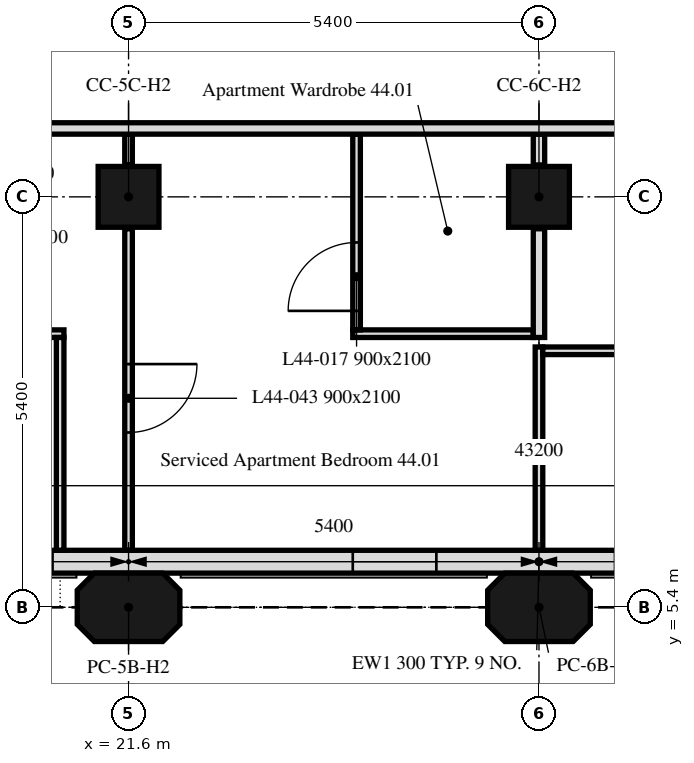
"""IFC4 building model, lengths in metres.
Left out: names, types, materials, properties, quantities, classifications, styles, units other than length and angle.
Written with IfcOpenShell. Run it as: python <this file> out.ifc"""

import sys

from ifc_helpers import new_model, si_unit, direction, frame, frame_2d, origin, origin_2d, place, context, subcontext, project, spatial, polyline, rectangle, outline, extrude, element, fill, save


model = new_model("IFC4")
c1 = context("Model", 3, precision=1e-05, world=origin(), true_north=direction((0.0, 1.0)))
c2 = subcontext(c1, "Body", "Model", "MODEL_VIEW")
j1 = project(units=[si_unit("LENGTHUNIT", "METRE"), si_unit("PLANEANGLEUNIT", "RADIAN")], contexts=[c1])
p1 = place(None, origin())
s1 = spatial("IfcSite", under=j1, at=p1, CompositionType="ELEMENT")
p2 = place(p1, origin())
s2 = spatial("IfcBuilding", under=s1, at=p2, CompositionType="ELEMENT")
p3 = place(p2, frame((0.0, 0.0, 184.0)))
s3 = spatial("IfcBuildingStorey", under=s2, at=p3, CompositionType="ELEMENT", Elevation=184.0)
for number, where, z_axis, x_axis in (
    (1, (21.6, 5.4, 0.0), (0.0, 0.0, 1.0), (1.0, 0.0, 0.0)),
    (2, (27.0, 5.4, 0.0), (0.0, 0.0, 1.0), (1.0, 0.0, 0.0)),
):
    element("IfcColumn", number, at=place(p3, frame(where, z_axis=z_axis, x_axis=x_axis)), inside=s3, PredefinedType="COLUMN", context=c2, shape_type="SweptSolid", body=[
        extrude(outline(polyline([(-0.45, -0.45), (0.45, -0.45), (0.675, -0.225), (0.675, 0.225), (0.45, 0.45), (-0.45, 0.45), (-0.675, 0.225), (-0.675, -0.225), (-0.45, -0.45)])), origin(), (0.0, 0.0, 1.0), 3.0),
    ])
for number, where, z_axis, x_axis in (
    (3, (21.6, 10.8, 0.0), (0.0, 0.0, 1.0), (1.0, 0.0, 0.0)),
    (4, (27.0, 10.8, 0.0), (0.0, 0.0, 1.0), (1.0, 0.0, 0.0)),
):
    element("IfcColumn", number, at=place(p3, frame(where, z_axis=z_axis, x_axis=x_axis)), inside=s3, PredefinedType="COLUMN", context=c2, shape_type="SweptSolid", body=[
        extrude(rectangle(XDim=0.8, YDim=0.8, at=origin_2d()), origin(), (0.0, 0.0, 1.0), 3.0),
    ])
p4 = place(p3, frame((10.986, 6.0, 0.0), z_axis=(0.0, 0.0, 1.0), x_axis=(1.0, 0.0, 0.0)))
e5 = element("IfcWall", 5, at=p4, inside=s3, PredefinedType="SOLIDWALL", context=c2, shape_type="SweptSolid", body=[
    extrude(rectangle(XDim=32.027, YDim=0.3, at=frame_2d((16.014, 0.0))), origin(), (0.0, 0.0, 1.0), 3.0),
])
p5 = place(p4, frame((2.764, 0.0, 0.9)))
e6 = element("IfcOpeningElement", 6, at=p5, cuts=e5, PredefinedType="OPENING", context=c2, shape_type="SweptSolid", body=[
    extrude(rectangle(XDim=1.1, YDim=1.7, at=frame_2d((0.55, 0.85))), frame((0.0, 0.16, 0.0), z_axis=(0.0, -1.0, 0.0), x_axis=(1.0, 0.0, 0.0)), (0.0, 0.0, 1.0), 0.32),
])
p6 = place(p4, frame((6.214, 0.0, 0.9)))
e7 = element("IfcOpeningElement", 7, at=p6, cuts=e5, PredefinedType="OPENING", context=c2, shape_type="SweptSolid", body=[
    extrude(rectangle(XDim=3.4, YDim=1.7, at=frame_2d((1.7, 0.85))), frame((0.0, 0.16, 0.0), z_axis=(0.0, -1.0, 0.0), x_axis=(1.0, 0.0, 0.0)), (0.0, 0.0, 1.0), 0.32),
])
p7 = place(p4, frame((13.564, 0.0, 0.9)))
e8 = element("IfcOpeningElement", 8, at=p7, cuts=e5, PredefinedType="OPENING", context=c2, shape_type="SweptSolid", body=[
    extrude(rectangle(XDim=1.1, YDim=1.7, at=frame_2d((0.55, 0.85))), frame((0.0, 0.16, 0.0), z_axis=(0.0, -1.0, 0.0), x_axis=(1.0, 0.0, 0.0)), (0.0, 0.0, 1.0), 0.32),
])
p8 = place(p4, frame((17.014, 0.0, 0.9)))
e9 = element("IfcOpeningElement", 9, at=p8, cuts=e5, PredefinedType="OPENING", context=c2, shape_type="SweptSolid", body=[
    extrude(rectangle(XDim=3.4, YDim=1.7, at=frame_2d((1.7, 0.85))), frame((0.0, 0.16, 0.0), z_axis=(0.0, -1.0, 0.0), x_axis=(1.0, 0.0, 0.0)), (0.0, 0.0, 1.0), 0.32),
])
p9 = place(p4, frame((24.364, 0.0, 0.9)))
e10 = element("IfcOpeningElement", 10, at=p9, cuts=e5, PredefinedType="OPENING", context=c2, shape_type="SweptSolid", body=[
    extrude(rectangle(XDim=1.1, YDim=1.7, at=frame_2d((0.55, 0.85))), frame((0.0, 0.16, 0.0), z_axis=(0.0, -1.0, 0.0), x_axis=(1.0, 0.0, 0.0)), (0.0, 0.0, 1.0), 0.32),
])
p10 = place(p4, frame((27.814, 0.0, 0.9)))
e11 = element("IfcOpeningElement", 11, at=p10, cuts=e5, PredefinedType="OPENING", context=c2, shape_type="SweptSolid", body=[
    extrude(rectangle(XDim=3.4, YDim=1.7, at=frame_2d((1.7, 0.85))), frame((0.0, 0.16, 0.0), z_axis=(0.0, -1.0, 0.0), x_axis=(1.0, 0.0, 0.0)), (0.0, 0.0, 1.0), 0.32),
])
p11 = place(p3, frame((27.0, 6.151, 0.0), z_axis=(0.0, 0.0, 1.0), x_axis=(0.0, 1.0, 0.0)))
e12 = element("IfcWall", 12, at=p11, inside=s3, PredefinedType="PARTITIONING", context=c2, shape_type="SweptSolid", body=[
    extrude(rectangle(XDim=2.674, YDim=0.1, at=frame_2d((1.337, 0.0))), origin(), (0.0, 0.0, 1.0), 3.0),
])
p12 = place(p3, frame((26.925, 9.0, 0.0), z_axis=(0.0, 0.0, 1.0), x_axis=(-1.0, 0.0, 0.0)))
e13 = element("IfcWall", 13, at=p12, inside=s3, PredefinedType="PARTITIONING", context=c2, shape_type="SweptSolid", body=[
    extrude(rectangle(XDim=2.375, YDim=0.1, at=frame_2d((1.188, 0.0))), origin(), (0.0, 0.0, 1.0), 3.0),
])
p13 = place(p3, frame((24.6, 9.05, 0.0), z_axis=(0.0, 0.0, 1.0), x_axis=(0.0, 1.0, 0.0)))
e14 = element("IfcWall", 14, at=p13, inside=s3, PredefinedType="PARTITIONING", context=c2, shape_type="SweptSolid", body=[
    extrude(rectangle(XDim=2.575, YDim=0.1, at=frame_2d((1.288, 0.0))), origin(), (0.0, 0.0, 1.0), 3.0),
])
p14 = place(p13, frame((0.25, 0.0, 0.0)))
e15 = element("IfcOpeningElement", 15, at=p14, cuts=e14, PredefinedType="OPENING", context=c2, shape_type="SweptSolid", body=[
    extrude(rectangle(XDim=0.9, YDim=2.1, at=frame_2d((0.45, 1.05))), frame((0.0, 0.05, 0.0), z_axis=(0.0, -1.0, 0.0), x_axis=(1.0, 0.0, 0.0)), (0.0, 0.0, 1.0), 0.1),
])
p15 = place(p3, frame((21.6, 11.625, 0.0), z_axis=(0.0, 0.0, 1.0), x_axis=(0.0, -1.0, 0.0)))
e16 = element("IfcWall", 16, at=p15, inside=s3, PredefinedType="PARTITIONING", context=c2, shape_type="SweptSolid", body=[
    extrude(rectangle(XDim=0.405, YDim=0.1, at=frame_2d((0.203, 0.0))), origin(), (0.0, 0.0, 1.0), 3.0),
])
p16 = place(p3, frame((21.6, 10.38, 0.0), z_axis=(0.0, 0.0, 1.0), x_axis=(0.0, -1.0, 0.0)))
e17 = element("IfcWall", 17, at=p16, inside=s3, PredefinedType="PARTITIONING", context=c2, shape_type="SweptSolid", body=[
    extrude(rectangle(XDim=4.229, YDim=0.1, at=frame_2d((2.115, 0.0))), origin(), (0.0, 0.0, 1.0), 3.0),
])
p17 = place(p16, frame((1.78, 0.0, 0.0)))
e18 = element("IfcOpeningElement", 18, at=p17, cuts=e17, PredefinedType="OPENING", context=c2, shape_type="SweptSolid", body=[
    extrude(rectangle(XDim=0.9, YDim=2.1, at=frame_2d((0.45, 1.05))), frame((0.0, 0.05, 0.0), z_axis=(0.0, -1.0, 0.0), x_axis=(1.0, 0.0, 0.0)), (0.0, 0.0, 1.0), 0.1),
])
p18 = place(p3, frame((16.275, 9.0, 0.0), z_axis=(0.0, 0.0, 1.0), x_axis=(1.0, 0.0, 0.0)))
e19 = element("IfcWall", 19, at=p18, inside=s3, PredefinedType="PARTITIONING", context=c2, shape_type="SweptSolid", body=[
    extrude(rectangle(XDim=4.475, YDim=0.1, at=frame_2d((2.238, 0.0))), origin(), (0.0, 0.0, 1.0), 3.0),
])
p19 = place(p18, frame((2.375, 0.0, 0.0)))
e20 = element("IfcOpeningElement", 20, at=p19, cuts=e19, PredefinedType="OPENING", context=c2, shape_type="SweptSolid", body=[
    extrude(rectangle(XDim=0.9, YDim=2.1, at=frame_2d((0.45, 1.05))), frame((0.0, 0.05, 0.0), z_axis=(0.0, -1.0, 0.0), x_axis=(1.0, 0.0, 0.0)), (0.0, 0.0, 1.0), 0.1),
])
p20 = place(p3, frame((20.7, 8.95, 0.0), z_axis=(0.0, 0.0, 1.0), x_axis=(0.0, -1.0, 0.0)))
e21 = element("IfcWall", 21, at=p20, inside=s3, PredefinedType="PARTITIONING", context=c2, shape_type="SweptSolid", body=[
    extrude(rectangle(XDim=2.799, YDim=0.1, at=frame_2d((1.399, 0.0))), origin(), (0.0, 0.0, 1.0), 3.0),
])
p21 = place(p3, frame((27.0, 8.95, 0.0), z_axis=(0.0, 0.0, 1.0), x_axis=(0.0, 1.0, 0.0)))
e22 = element("IfcWall", 22, at=p21, inside=s3, PredefinedType="PARTITIONING", context=c2, shape_type="SweptSolid", body=[
    extrude(rectangle(XDim=1.43, YDim=0.15, at=frame_2d((0.715, 0.0))), origin(), (0.0, 0.0, 1.0), 3.0),
])
p22 = place(p3, frame((27.0, 11.22, 0.0), z_axis=(0.0, 0.0, 1.0), x_axis=(0.0, 1.0, 0.0)))
e23 = element("IfcWall", 23, at=p22, inside=s3, PredefinedType="PARTITIONING", context=c2, shape_type="SweptSolid", body=[
    extrude(rectangle(XDim=0.405, YDim=0.15, at=frame_2d((0.203, 0.0))), origin(), (0.0, 0.0, 1.0), 3.0),
])
p23 = place(p3, frame((27.05, 8.775, 0.0), z_axis=(0.0, 0.0, 1.0), x_axis=(1.0, 0.0, 0.0)))
e24 = element("IfcWall", 24, at=p23, inside=s3, PredefinedType="PARTITIONING", context=c2, shape_type="SweptSolid", body=[
    extrude(rectangle(XDim=2.0, YDim=0.1, at=frame_2d((1.0, 0.0))), origin(), (0.0, 0.0, 1.0), 3.0),
])
p24 = place(p3, frame((6.151, 11.7, 0.0), z_axis=(0.0, 0.0, 1.0), x_axis=(1.0, 0.0, 0.0)))
e25 = element("IfcWall", 25, at=p24, inside=s3, PredefinedType="PARTITIONING", context=c2, shape_type="SweptSolid", body=[
    extrude(rectangle(XDim=41.698, YDim=0.15, at=frame_2d((20.849, 0.0))), origin(), (0.0, 0.0, 1.0), 3.0),
])
p25 = place(p24, frame((1.449, 0.0, 0.0)))
e26 = element("IfcOpeningElement", 26, at=p25, cuts=e25, PredefinedType="OPENING", context=c2, shape_type="SweptSolid", body=[
    extrude(rectangle(XDim=1.0, YDim=2.1, at=frame_2d((0.5, 1.05))), frame((0.0, 0.075, 0.0), z_axis=(0.0, -1.0, 0.0), x_axis=(1.0, 0.0, 0.0)), (0.0, 0.0, 1.0), 0.15),
])
p26 = place(p24, frame((37.954, 0.0, 0.0)))
e27 = element("IfcOpeningElement", 27, at=p26, cuts=e25, PredefinedType="OPENING", context=c2, shape_type="SweptSolid", body=[
    extrude(rectangle(XDim=1.0, YDim=2.1, at=frame_2d((0.5, 1.05))), frame((0.0, 0.075, 0.0), z_axis=(0.0, -1.0, 0.0), x_axis=(1.0, 0.0, 0.0)), (0.0, 0.0, 1.0), 0.15),
])
p27 = place(p24, frame((12.449, 0.0, 0.0)))
e28 = element("IfcOpeningElement", 28, at=p27, cuts=e25, PredefinedType="OPENING", context=c2, shape_type="SweptSolid", body=[
    extrude(rectangle(XDim=1.0, YDim=2.1, at=frame_2d((0.5, 1.05))), frame((0.0, 0.075, 0.0), z_axis=(0.0, -1.0, 0.0), x_axis=(1.0, 0.0, 0.0)), (0.0, 0.0, 1.0), 0.15),
])
p28 = place(p24, frame((23.249, 0.0, 0.0)))
e29 = element("IfcOpeningElement", 29, at=p28, cuts=e25, PredefinedType="OPENING", context=c2, shape_type="SweptSolid", body=[
    extrude(rectangle(XDim=1.0, YDim=2.1, at=frame_2d((0.5, 1.05))), frame((0.0, 0.075, 0.0), z_axis=(0.0, -1.0, 0.0), x_axis=(1.0, 0.0, 0.0)), (0.0, 0.0, 1.0), 0.15),
])
p29 = place(p7, origin())
e30 = element("IfcWindow", 30, at=p29, inside=s3, PartitioningType="SINGLE_PANEL", PredefinedType="WINDOW", context=c2, shape_type="SweptSolid", body=[
    extrude(rectangle(XDim=1.1, YDim=1.7, at=frame_2d((0.55, 0.85))), frame((0.0, 0.03, 0.0), z_axis=(0.0, -1.0, 0.0), x_axis=(1.0, 0.0, 0.0)), (0.0, 0.0, 1.0), 0.06),
])
fill(e8, e30)
p30 = place(p14, origin())
e31 = element("IfcDoor", 31, at=p30, inside=s3, OperationType="SINGLE_SWING_RIGHT", PredefinedType="DOOR", context=c2, shape_type="SweptSolid", body=[
    extrude(rectangle(XDim=0.9, YDim=2.1, at=frame_2d((0.45, 1.05))), frame((0.0, 0.025, 0.0), z_axis=(0.0, -1.0, 0.0), x_axis=(1.0, 0.0, 0.0)), (0.0, 0.0, 1.0), 0.05),
])
fill(e15, e31)
p31 = place(p17, origin())
e32 = element("IfcDoor", 32, at=p31, inside=s3, OperationType="SINGLE_SWING_LEFT", PredefinedType="DOOR", context=c2, shape_type="SweptSolid", body=[
    extrude(rectangle(XDim=0.9, YDim=2.1, at=frame_2d((0.45, 1.05))), frame((0.0, 0.025, 0.0), z_axis=(0.0, -1.0, 0.0), x_axis=(1.0, 0.0, 0.0)), (0.0, 0.0, 1.0), 0.05),
])
fill(e18, e32)
save(model, sys.argv[1])
